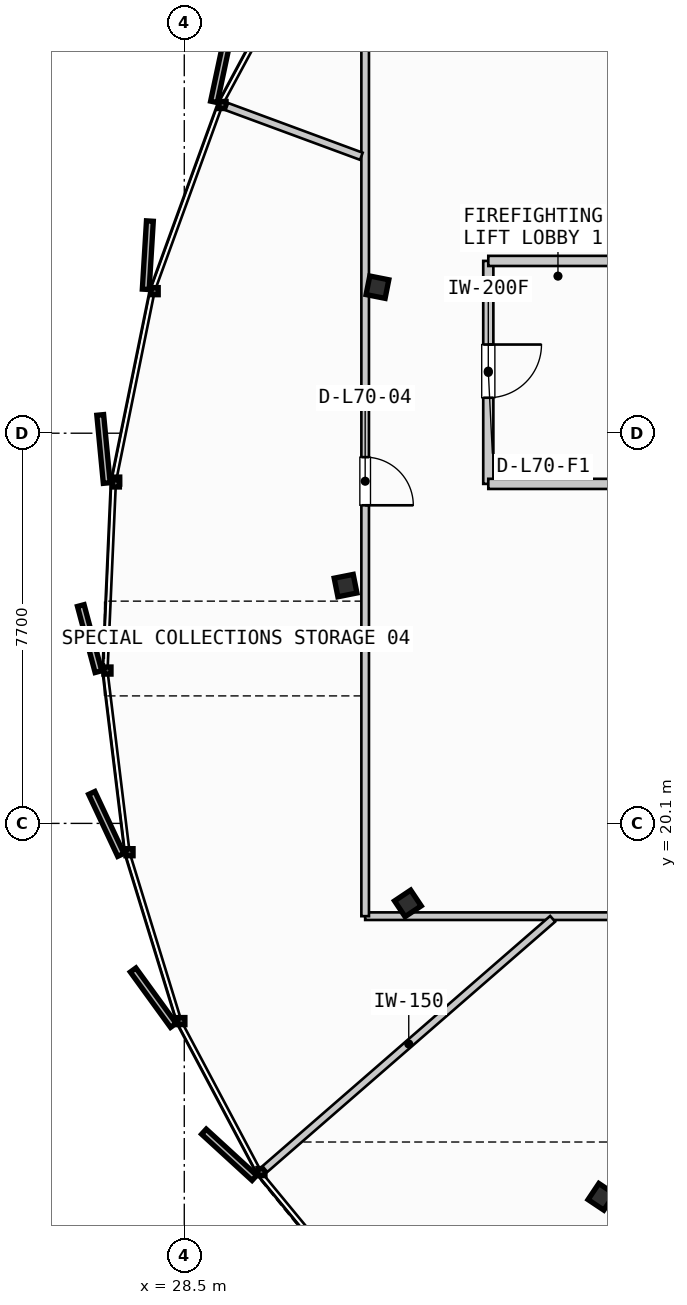
"""IFC4 building model, lengths in metres.
Left out: names, types, materials, properties, quantities, classifications, styles, units other than length and angle.
Written with IfcOpenShell. Run it as: python <this file> out.ifc"""

import sys

from ifc_helpers import new_model, si_unit, direction, frame, frame_2d, origin, origin_2d, place, context, subcontext, project, spatial, rectangle, i_section, extrude, source, transform, mapped, element, fill, save


model = new_model("IFC4")
c1 = context("Model", 3, precision=1e-05, world=origin(), true_north=direction((0.0, 1.0)))
c2 = subcontext(c1, "Body", "Model", "MODEL_VIEW")
j1 = project(units=[si_unit("LENGTHUNIT", "METRE"), si_unit("PLANEANGLEUNIT", "RADIAN")], contexts=[c1])
p1 = place(None, origin())
s1 = spatial("IfcSite", under=j1, at=p1, CompositionType="ELEMENT")
p2 = place(p1, origin())
s2 = spatial("IfcBuilding", under=s1, at=p2, CompositionType="ELEMENT")
p3 = place(p2, frame((0.0, 0.0, 266.35)))
s3 = spatial("IfcBuildingStorey", under=s2, at=p3, CompositionType="ELEMENT", Elevation=266.35)
m1 = source(origin(), c2, "Body", "SweptSolid", [
    extrude(i_section(OverallWidth=0.374, OverallDepth=0.383, WebThickness=0.017, FlangeThickness=0.026, FilletRadius=0.015, at=origin_2d()), origin(), (0.0, 0.0, 1.0), 3.21),
])
for number, where, z_axis, x_axis in (
    (1, (32.312, 30.682, 0.0), (0.0, 0.0, 1.0), (-0.981, 0.195, 0.0)),
    (2, (31.683, 24.793, 0.0), (0.0, 0.0, 1.0), (-0.981, -0.195, 0.0)),
    (3, (32.913, 18.521, 0.0), (0.0, 0.0, 1.0), (-0.831, -0.556, 0.0)),
    (4, (36.731, 12.731, 0.0), (0.0, 0.0, 1.0), (-0.556, -0.831, 0.0)),
):
    element("IfcColumn", number, at=place(p3, frame(where, z_axis=z_axis, x_axis=x_axis)), inside=s3, PredefinedType="COLUMN", context=c2, shape_type="MappedRepresentation", body=[
        mapped(m1, transform((0.0, 0.0, 0.0), scale=1.0)),
    ])
p4 = place(p3, frame((34.5, 31.2, 0.0), z_axis=(0.0, 0.0, 1.0), x_axis=(0.0, -1.0, 0.0)))
e5 = element("IfcWall", 5, at=p4, inside=s3, PredefinedType="PARTITIONING", context=c2, shape_type="SweptSolid", body=[
    extrude(rectangle(XDim=4.4, YDim=0.2, at=frame_2d((2.2, 0.0))), origin(), (0.0, 0.0, 1.0), 2.595),
])
p5 = place(p4, frame((1.65, 0.0, 0.0)))
e6 = element("IfcOpeningElement", 6, at=p5, cuts=e5, PredefinedType="OPENING", context=c2, shape_type="SweptSolid", body=[
    extrude(rectangle(XDim=1.05, YDim=2.15, at=frame_2d((0.525, 1.075))), frame((0.0, 0.11, 0.0), z_axis=(0.0, -1.0, 0.0), x_axis=(1.0, 0.0, 0.0)), (0.0, 0.0, 1.0), 0.22),
])
for number, where, z_axis, x_axis in (
    (7, (34.5, 26.8, 0.0), (0.0, 0.0, 1.0), (1.0, 0.0, 0.0)),
    (8, (34.5, 31.2, 0.0), (0.0, 0.0, 1.0), (1.0, 0.0, 0.0)),
):
    element("IfcWall", number, at=place(p3, frame(where, z_axis=z_axis, x_axis=x_axis)), inside=s3, PredefinedType="PARTITIONING", context=c2, shape_type="SweptSolid", body=[
        extrude(rectangle(XDim=3.265, YDim=0.2, at=frame_2d((1.632, 0.0))), origin(), (0.0, 0.0, 1.0), 2.595),
    ])
p6 = place(p3, frame((32.07, 18.269, 0.0), z_axis=(0.0, 0.0, 1.0), x_axis=(1.0, 0.0, 0.0)))
e9 = element("IfcWall", 9, at=p6, inside=s3, PredefinedType="PARTITIONING", context=c2, shape_type="SweptSolid", body=[
    extrude(rectangle(XDim=29.156, YDim=0.15, at=frame_2d((14.578, 0.0))), origin(), (0.0, 0.0, 1.0), 2.595),
])
p7 = place(p6, frame((13.599, 0.0, 0.0)))
e10 = element("IfcOpeningElement", 10, at=p7, cuts=e9, PredefinedType="OPENING", context=c2, shape_type="SweptSolid", body=[
    extrude(rectangle(XDim=0.95, YDim=2.15, at=frame_2d((0.475, 1.075))), frame((0.0, 0.085, 0.0), z_axis=(0.0, -1.0, 0.0), x_axis=(1.0, 0.0, 0.0)), (0.0, 0.0, 1.0), 0.17),
])
p8 = place(p3, frame((32.07, 37.1, 0.0), z_axis=(0.0, 0.0, 1.0), x_axis=(0.0, -1.0, 0.0)))
e11 = element("IfcWall", 11, at=p8, inside=s3, PredefinedType="PARTITIONING", context=c2, shape_type="SweptSolid", body=[
    extrude(rectangle(XDim=18.831, YDim=0.15, at=frame_2d((9.416, 0.0))), origin(), (0.0, 0.0, 1.0), 2.595),
])
p9 = place(p8, frame((9.772, 0.0, 0.0)))
e12 = element("IfcOpeningElement", 12, at=p9, cuts=e11, PredefinedType="OPENING", context=c2, shape_type="SweptSolid", body=[
    extrude(rectangle(XDim=0.95, YDim=2.15, at=frame_2d((0.475, 1.075))), frame((0.0, 0.085, 0.0), z_axis=(0.0, -1.0, 0.0), x_axis=(1.0, 0.0, 0.0)), (0.0, 0.0, 1.0), 0.17),
])
p10 = place(p3, frame((35.77, 18.217, 0.0), z_axis=(0.0, 0.0, 1.0), x_axis=(-0.754644626674, -0.656133742031, 0.0)))
e13 = element("IfcWall", 13, at=p10, inside=s3, PredefinedType="PARTITIONING", context=c2, shape_type="SweptSolid", body=[
    extrude(rectangle(XDim=7.527, YDim=0.15, at=frame_2d((3.763, 0.0))), origin(), (0.0, 0.0, 1.0), 2.595),
])
p11 = place(p3, frame((31.995, 33.265, 0.0), z_axis=(0.0, 0.0, 1.0), x_axis=(-0.938082247265, 0.346412611442, 0.0)))
e14 = element("IfcWall", 14, at=p11, inside=s3, PredefinedType="PARTITIONING", context=c2, shape_type="SweptSolid", body=[
    extrude(rectangle(XDim=2.831, YDim=0.15, at=frame_2d((1.416, 0.0))), origin(), (0.0, 0.0, 1.0), 2.595),
])
m2 = source(origin(), c2, "Body", "SweptSolid", [
    extrude(rectangle(XDim=1.05, YDim=2.15, at=frame_2d((0.525, 1.075))), frame((0.0, 0.025, 0.0), z_axis=(0.0, -1.0, 0.0), x_axis=(1.0, 0.0, 0.0)), (0.0, 0.0, 1.0), 0.05),
])
p12 = place(p5, origin())
e15 = element("IfcDoor", 15, at=p12, inside=s3, OperationType="SINGLE_SWING_LEFT", PredefinedType="DOOR", context=c2, shape_type="MappedRepresentation", body=[
    mapped(m2, transform((0.0, 0.0, 0.0), scale=1.0)),
])
fill(e6, e15)
m3 = source(origin(), c2, "Body", "SweptSolid", [
    extrude(rectangle(XDim=0.95, YDim=2.15, at=frame_2d((0.475, 1.075))), frame((0.0, 0.025, 0.0), z_axis=(0.0, -1.0, 0.0), x_axis=(1.0, 0.0, 0.0)), (0.0, 0.0, 1.0), 0.05),
])
p13 = place(p9, origin())
e16 = element("IfcDoor", 16, at=p13, inside=s3, OperationType="SINGLE_SWING_RIGHT", PredefinedType="DOOR", context=c2, shape_type="MappedRepresentation", body=[
    mapped(m3, transform((0.0, 0.0, 0.0), scale=1.0)),
])
fill(e12, e16)
save(model, sys.argv[1])
